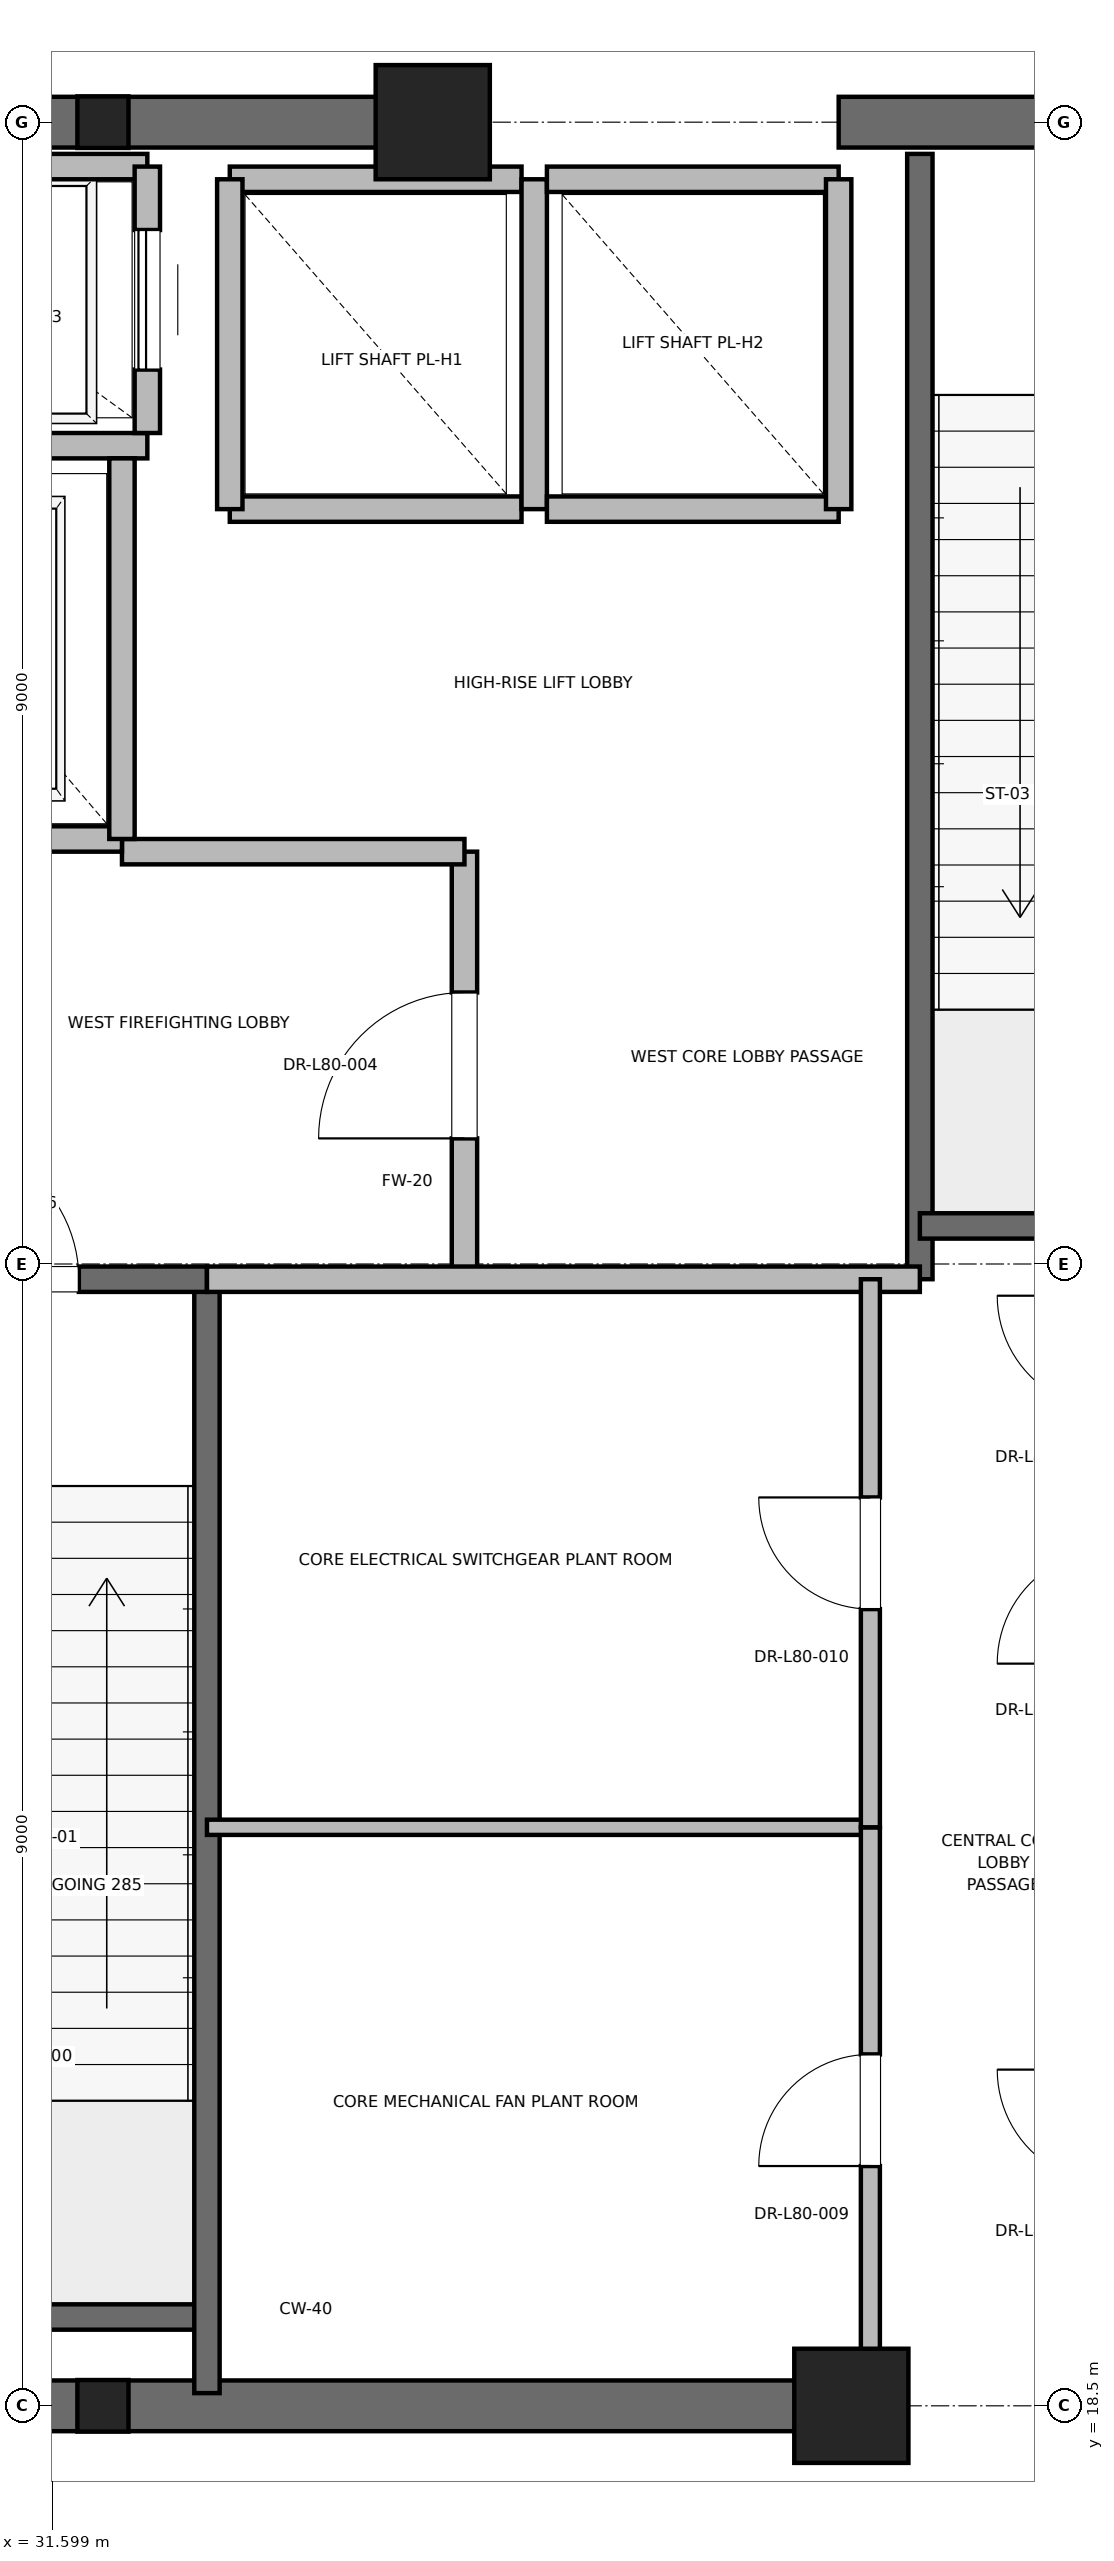
"""IFC4 building model, lengths in metres.
Left out: names, types, materials, properties, quantities, classifications, styles, units other than length and angle.
Written with IfcOpenShell. Run it as: python <this file> out.ifc"""

import sys

from ifc_helpers import new_model, si_unit, direction, frame, frame_2d, origin, origin_2d, place, context, subcontext, project, spatial, rectangle, i_section, extrude, element, fill, save


model = new_model("IFC4")
c1 = context("Model", 3, precision=1e-05, world=origin(), true_north=direction((0.0, 1.0)))
c2 = subcontext(c1, "Body", "Model", "MODEL_VIEW")
j1 = project(units=[si_unit("LENGTHUNIT", "METRE"), si_unit("PLANEANGLEUNIT", "RADIAN")], contexts=[c1])
p1 = place(None, origin())
s1 = spatial("IfcSite", under=j1, at=p1, CompositionType="ELEMENT")
p2 = place(p1, origin())
s2 = spatial("IfcBuilding", under=s1, at=p2, CompositionType="ELEMENT")
p3 = place(p2, frame((0.0, 0.0, 342.8)))
s3 = spatial("IfcBuildingStorey", under=s2, at=p3, CompositionType="ELEMENT", Elevation=342.8)
for number, where, z_axis, x_axis in (
    (1, (37.9, 18.5, 0.0), (0.0, 0.0, 1.0), (1.0, 0.0, 0.0)),
    (2, (34.6, 36.5, 0.0), (0.0, 0.0, 1.0), (1.0, 0.0, 0.0)),
):
    element("IfcColumn", number, at=place(p3, frame(where, z_axis=z_axis, x_axis=x_axis)), inside=s3, PredefinedType="PILASTER", context=c2, shape_type="SweptSolid", body=[
        extrude(rectangle(XDim=0.9, YDim=0.9, at=origin_2d()), origin(), (0.0, 0.0, 1.0), 6.0),
    ])
for number, where, z_axis, x_axis in (
    (3, (32.0, 18.5, 0.0), (0.0, 0.0, 1.0), (1.0, 0.0, 0.0)),
    (4, (32.0, 36.5, 0.0), (0.0, 0.0, 1.0), (1.0, 0.0, 0.0)),
):
    element("IfcColumn", number, at=place(p3, frame(where, z_axis=z_axis, x_axis=x_axis)), inside=s3, PredefinedType="COLUMN", context=c2, shape_type="SweptSolid", body=[
        extrude(i_section(OverallWidth=0.403, OverallDepth=0.406, WebThickness=0.027, FlangeThickness=0.043, FilletRadius=0.015, at=origin_2d()), origin(), (0.0, 0.0, 1.0), 6.0),
    ])
p4 = place(p3, frame((29.0, 18.5, 0.0), z_axis=(0.0, 0.0, 1.0), x_axis=(1.0, 0.0, 0.0)))
e5 = element("IfcWall", 5, at=p4, inside=s3, PredefinedType="SHEAR", context=c2, shape_type="SweptSolid", body=[
    extrude(rectangle(XDim=9.2, YDim=0.4, at=frame_2d((4.6, 0.0))), origin(), (0.0, 0.0, 1.0), 5.7),
])
p5 = place(p3, frame((29.0, 36.5, 0.0), z_axis=(0.0, 0.0, 1.0), x_axis=(1.0, 0.0, 0.0)))
e6 = element("IfcWall", 6, at=p5, inside=s3, PredefinedType="SHEAR", context=c2, shape_type="SweptSolid", body=[
    extrude(rectangle(XDim=5.8, YDim=0.4, at=frame_2d((2.9, 0.0))), origin(), (0.0, 0.0, 1.0), 5.7),
])
p6 = place(p3, frame((37.8, 36.5, 0.0), z_axis=(0.0, 0.0, 1.0), x_axis=(1.0, 0.0, 0.0)))
e7 = element("IfcWall", 7, at=p6, inside=s3, PredefinedType="SHEAR", context=c2, shape_type="SweptSolid", body=[
    extrude(rectangle(XDim=4.4, YDim=0.4, at=frame_2d((2.2, 0.0))), origin(), (0.0, 0.0, 1.0), 5.7),
])
p7 = place(p6, frame((1.65, 0.0, 0.0)))
e8 = element("IfcOpeningElement", 8, at=p7, cuts=e7, PredefinedType="OPENING", context=c2, shape_type="SweptSolid", body=[
    extrude(rectangle(XDim=1.1, YDim=2.15, at=frame_2d((0.55, 1.075))), frame((0.0, 0.2, 0.0), z_axis=(0.0, -1.0, 0.0), x_axis=(1.0, 0.0, 0.0)), (0.0, 0.0, 1.0), 0.4),
])
p8 = place(p3, frame((29.7, 19.2, 0.0), z_axis=(0.0, 0.0, 1.0), x_axis=(1.0, 0.0, 0.0)))
e9 = element("IfcWall", 9, at=p8, inside=s3, PredefinedType="SOLIDWALL", context=c2, shape_type="SweptSolid", body=[
    extrude(rectangle(XDim=3.12, YDim=0.2, at=frame_2d((1.56, 0.0))), origin(), (0.0, 0.0, 1.0), 5.7),
])
p9 = place(p3, frame((32.82, 18.6, 0.0), z_axis=(0.0, 0.0, 1.0), x_axis=(0.0, 1.0, 0.0)))
e10 = element("IfcWall", 10, at=p9, inside=s3, PredefinedType="SOLIDWALL", context=c2, shape_type="SweptSolid", body=[
    extrude(rectangle(XDim=8.78, YDim=0.2, at=frame_2d((4.39, 0.0))), origin(), (0.0, 0.0, 1.0), 5.7),
])
p10 = place(p3, frame((29.7, 27.38, 0.0), z_axis=(0.0, 0.0, 1.0), x_axis=(1.0, 0.0, 0.0)))
e11 = element("IfcWall", 11, at=p10, inside=s3, PredefinedType="SOLIDWALL", context=c2, shape_type="SweptSolid", body=[
    extrude(rectangle(XDim=3.12, YDim=0.2, at=frame_2d((1.56, 0.0))), origin(), (0.0, 0.0, 1.0), 5.7),
])
p11 = place(p10, frame((1.01, 0.0, 0.0)))
e12 = element("IfcOpeningElement", 12, at=p11, cuts=e11, PredefinedType="OPENING", context=c2, shape_type="SweptSolid", body=[
    extrude(rectangle(XDim=1.1, YDim=2.15, at=frame_2d((0.55, 1.075))), frame((0.0, 0.1, 0.0), z_axis=(0.0, -1.0, 0.0), x_axis=(1.0, 0.0, 0.0)), (0.0, 0.0, 1.0), 0.2),
])
p12 = place(p3, frame((38.44, 27.38, 0.0), z_axis=(0.0, 0.0, 1.0), x_axis=(0.0, 1.0, 0.0)))
e13 = element("IfcWall", 13, at=p12, inside=s3, PredefinedType="SOLIDWALL", context=c2, shape_type="SweptSolid", body=[
    extrude(rectangle(XDim=8.87, YDim=0.2, at=frame_2d((4.435, 0.0))), origin(), (0.0, 0.0, 1.0), 5.7),
])
p13 = place(p3, frame((38.44, 27.8, 0.0), z_axis=(0.0, 0.0, 1.0), x_axis=(1.0, 0.0, 0.0)))
e14 = element("IfcWall", 14, at=p13, inside=s3, PredefinedType="SOLIDWALL", context=c2, shape_type="SweptSolid", body=[
    extrude(rectangle(XDim=3.32, YDim=0.2, at=frame_2d((1.66, 0.0))), origin(), (0.0, 0.0, 1.0), 5.7),
])
p14 = place(p3, frame((34.85, 27.38, 0.0), z_axis=(0.0, 0.0, 1.0), x_axis=(0.0, 1.0, 0.0)))
e15 = element("IfcWall", 15, at=p14, inside=s3, PredefinedType="PARTITIONING", context=c2, shape_type="SweptSolid", body=[
    extrude(rectangle(XDim=3.37, YDim=0.2, at=frame_2d((1.685, 0.0))), origin(), (0.0, 0.0, 1.0), 5.7),
])
p15 = place(p14, frame((1.11, 0.0, 0.0)))
e16 = element("IfcOpeningElement", 16, at=p15, cuts=e15, PredefinedType="OPENING", context=c2, shape_type="SweptSolid", body=[
    extrude(rectangle(XDim=1.15, YDim=2.2, at=frame_2d((0.575, 1.1))), frame((0.0, 0.1, 0.0), z_axis=(0.0, -1.0, 0.0), x_axis=(1.0, 0.0, 0.0)), (0.0, 0.0, 1.0), 0.2),
])
p16 = place(p3, frame((32.82, 27.38, 0.0), z_axis=(0.0, 0.0, 1.0), x_axis=(1.0, 0.0, 0.0)))
e17 = element("IfcWall", 17, at=p16, inside=s3, PredefinedType="PARTITIONING", context=c2, shape_type="SweptSolid", body=[
    extrude(rectangle(XDim=5.62, YDim=0.2, at=frame_2d((2.81, 0.0))), origin(), (0.0, 0.0, 1.0), 5.7),
])
p17 = place(p3, frame((32.15, 30.75, 0.0), z_axis=(0.0, 0.0, 1.0), x_axis=(1.0, 0.0, 0.0)))
e18 = element("IfcWall", 18, at=p17, inside=s3, PredefinedType="PARTITIONING", context=c2, shape_type="SweptSolid", body=[
    extrude(rectangle(XDim=2.7, YDim=0.2, at=frame_2d((1.35, 0.0))), origin(), (0.0, 0.0, 1.0), 5.7),
])
p18 = place(p3, frame((29.55, 30.85, 0.0), z_axis=(0.0, 0.0, 1.0), x_axis=(1.0, 0.0, 0.0)))
e19 = element("IfcWall", 19, at=p18, inside=s3, PredefinedType="SOLIDWALL", context=c2, shape_type="SweptSolid", body=[
    extrude(rectangle(XDim=2.6, YDim=0.2, at=frame_2d((1.3, 0.0))), origin(), (0.0, 0.0, 1.0), 4.78),
])
p19 = place(p18, frame((0.75, 0.0, 0.0)))
e20 = element("IfcOpeningElement", 20, at=p19, cuts=e19, PredefinedType="OPENING", context=c2, shape_type="SweptSolid", body=[
    extrude(rectangle(XDim=1.1, YDim=2.2, at=frame_2d((0.55, 1.1))), frame((0.0, 0.1, 0.0), z_axis=(0.0, -1.0, 0.0), x_axis=(1.0, 0.0, 0.0)), (0.0, 0.0, 1.0), 0.2),
])
p20 = place(p3, frame((29.55, 33.95, 0.0), z_axis=(0.0, 0.0, 1.0), x_axis=(1.0, 0.0, 0.0)))
e21 = element("IfcWall", 21, at=p20, inside=s3, PredefinedType="SOLIDWALL", context=c2, shape_type="SweptSolid", body=[
    extrude(rectangle(XDim=2.8, YDim=0.2, at=frame_2d((1.4, 0.0))), origin(), (0.0, 0.0, 1.0), 5.7),
])
p21 = place(p3, frame((32.15, 30.85, 0.0), z_axis=(0.0, 0.0, 1.0), x_axis=(0.0, 1.0, 0.0)))
e22 = element("IfcWall", 22, at=p21, inside=s3, PredefinedType="SOLIDWALL", context=c2, shape_type="SweptSolid", body=[
    extrude(rectangle(XDim=3.0, YDim=0.2, at=frame_2d((1.5, 0.0))), origin(), (0.0, 0.0, 1.0), 5.7),
])
p22 = place(p3, frame((32.35, 36.15, 0.0), z_axis=(0.0, 0.0, 1.0), x_axis=(-1.0, 0.0, 0.0)))
e23 = element("IfcWall", 23, at=p22, inside=s3, PredefinedType="SOLIDWALL", context=c2, shape_type="SweptSolid", body=[
    extrude(rectangle(XDim=2.8, YDim=0.2, at=frame_2d((1.4, 0.0))), origin(), (0.0, 0.0, 1.0), 4.753),
])
p23 = place(p3, frame((32.35, 34.05, 0.0), z_axis=(0.0, 0.0, 1.0), x_axis=(0.0, 1.0, 0.0)))
e24 = element("IfcWall", 24, at=p23, inside=s3, PredefinedType="SOLIDWALL", context=c2, shape_type="SweptSolid", body=[
    extrude(rectangle(XDim=2.1, YDim=0.2, at=frame_2d((1.05, 0.0))), origin(), (0.0, 0.0, 1.0), 5.7),
])
p24 = place(p23, frame((0.5, 0.0, 0.0)))
e25 = element("IfcOpeningElement", 25, at=p24, cuts=e24, PredefinedType="OPENING", context=c2, shape_type="SweptSolid", body=[
    extrude(rectangle(XDim=1.1, YDim=2.2, at=frame_2d((0.55, 1.1))), frame((0.0, 0.1, 0.0), z_axis=(0.0, -1.0, 0.0), x_axis=(1.0, 0.0, 0.0)), (0.0, 0.0, 1.0), 0.2),
])
p25 = place(p3, frame((33.0, 33.45, 0.0), z_axis=(0.0, 0.0, 1.0), x_axis=(1.0, 0.0, 0.0)))
e26 = element("IfcWall", 26, at=p25, inside=s3, PredefinedType="SOLIDWALL", context=c2, shape_type="SweptSolid", body=[
    extrude(rectangle(XDim=2.3, YDim=0.2, at=frame_2d((1.15, 0.0))), origin(), (0.0, 0.0, 1.0), 5.7),
])
p26 = place(p3, frame((35.3, 36.05, 0.0), z_axis=(0.0, 0.0, 1.0), x_axis=(-1.0, 0.0, 0.0)))
e27 = element("IfcWall", 27, at=p26, inside=s3, PredefinedType="SOLIDWALL", context=c2, shape_type="SweptSolid", body=[
    extrude(rectangle(XDim=2.3, YDim=0.2, at=frame_2d((1.15, 0.0))), origin(), (0.0, 0.0, 1.0), 4.78),
])
p27 = place(p3, frame((33.0, 36.05, 0.0), z_axis=(0.0, 0.0, 1.0), x_axis=(0.0, -1.0, 0.0)))
e28 = element("IfcWall", 28, at=p27, inside=s3, PredefinedType="SOLIDWALL", context=c2, shape_type="SweptSolid", body=[
    extrude(rectangle(XDim=2.6, YDim=0.2, at=frame_2d((1.3, 0.0))), origin(), (0.0, 0.0, 1.0), 5.7),
])
p28 = place(p3, frame((35.4, 33.45, 0.0), z_axis=(0.0, 0.0, 1.0), x_axis=(0.0, 1.0, 0.0)))
e29 = element("IfcWall", 29, at=p28, inside=s3, PredefinedType="SOLIDWALL", context=c2, shape_type="SweptSolid", body=[
    extrude(rectangle(XDim=2.6, YDim=0.2, at=frame_2d((1.3, 0.0))), origin(), (0.0, 0.0, 1.0), 4.78),
])
p29 = place(p3, frame((35.5, 33.45, 0.0), z_axis=(0.0, 0.0, 1.0), x_axis=(1.0, 0.0, 0.0)))
e30 = element("IfcWall", 30, at=p29, inside=s3, PredefinedType="SOLIDWALL", context=c2, shape_type="SweptSolid", body=[
    extrude(rectangle(XDim=2.3, YDim=0.2, at=frame_2d((1.15, 0.0))), origin(), (0.0, 0.0, 1.0), 5.7),
])
p30 = place(p3, frame((37.8, 36.05, 0.0), z_axis=(0.0, 0.0, 1.0), x_axis=(-1.0, 0.0, 0.0)))
e31 = element("IfcWall", 31, at=p30, inside=s3, PredefinedType="SOLIDWALL", context=c2, shape_type="SweptSolid", body=[
    extrude(rectangle(XDim=2.3, YDim=0.2, at=frame_2d((1.15, 0.0))), origin(), (0.0, 0.0, 1.0), 4.78),
])
p31 = place(p3, frame((37.8, 33.45, 0.0), z_axis=(0.0, 0.0, 1.0), x_axis=(0.0, 1.0, 0.0)))
e32 = element("IfcWall", 32, at=p31, inside=s3, PredefinedType="SOLIDWALL", context=c2, shape_type="SweptSolid", body=[
    extrude(rectangle(XDim=2.6, YDim=0.2, at=frame_2d((1.3, 0.0))), origin(), (0.0, 0.0, 1.0), 4.78),
])
p32 = place(p3, frame((32.82, 23.06, 0.0), z_axis=(0.0, 0.0, 1.0), x_axis=(1.0, 0.0, 0.0)))
e33 = element("IfcWall", 33, at=p32, inside=s3, PredefinedType="PARTITIONING", context=c2, shape_type="SweptSolid", body=[
    extrude(rectangle(XDim=5.23, YDim=0.12, at=frame_2d((2.615, 0.0))), origin(), (0.0, 0.0, 1.0), 2.85),
])
p33 = place(p3, frame((38.05, 18.6, 0.0), z_axis=(0.0, 0.0, 1.0), x_axis=(0.0, 1.0, 0.0)))
e34 = element("IfcWall", 34, at=p33, inside=s3, PredefinedType="PARTITIONING", context=c2, shape_type="SweptSolid", body=[
    extrude(rectangle(XDim=4.46, YDim=0.15, at=frame_2d((2.23, 0.0))), origin(), (0.0, 0.0, 1.0), 2.85),
])
p34 = place(p33, frame((1.79, 0.0, 0.0)))
e35 = element("IfcOpeningElement", 35, at=p34, cuts=e34, PredefinedType="OPENING", context=c2, shape_type="SweptSolid", body=[
    extrude(rectangle(XDim=0.88, YDim=2.1, at=frame_2d((0.44, 1.05))), frame((0.0, 0.075, 0.0), z_axis=(0.0, -1.0, 0.0), x_axis=(1.0, 0.0, 0.0)), (0.0, 0.0, 1.0), 0.15),
])
p35 = place(p3, frame((38.05, 23.06, 0.0), z_axis=(0.0, 0.0, 1.0), x_axis=(0.0, 1.0, 0.0)))
e36 = element("IfcWall", 36, at=p35, inside=s3, PredefinedType="PARTITIONING", context=c2, shape_type="SweptSolid", body=[
    extrude(rectangle(XDim=4.32, YDim=0.15, at=frame_2d((2.16, 0.0))), origin(), (0.0, 0.0, 1.0), 2.85),
])
p36 = place(p35, frame((1.72, 0.0, 0.0)))
e37 = element("IfcOpeningElement", 37, at=p36, cuts=e36, PredefinedType="OPENING", context=c2, shape_type="SweptSolid", body=[
    extrude(rectangle(XDim=0.88, YDim=2.1, at=frame_2d((0.44, 1.05))), frame((0.0, 0.075, 0.0), z_axis=(0.0, -1.0, 0.0), x_axis=(1.0, 0.0, 0.0)), (0.0, 0.0, 1.0), 0.15),
])
p37 = place(p11, origin())
e38 = element("IfcDoor", 38, at=p37, inside=s3, OperationType="SINGLE_SWING_LEFT", PredefinedType="DOOR", context=c2, shape_type="SweptSolid", body=[
    extrude(rectangle(XDim=1.1, YDim=2.15, at=frame_2d((0.55, 1.075))), frame((0.0, 0.025, 0.0), z_axis=(0.0, -1.0, 0.0), x_axis=(1.0, 0.0, 0.0)), (0.0, 0.0, 1.0), 0.05),
])
fill(e12, e38)
p38 = place(p15, origin())
e39 = element("IfcDoor", 39, at=p38, inside=s3, OperationType="SINGLE_SWING_LEFT", PredefinedType="DOOR", context=c2, shape_type="SweptSolid", body=[
    extrude(rectangle(XDim=1.15, YDim=2.2, at=frame_2d((0.575, 1.1))), frame((0.0, 0.025, 0.0), z_axis=(0.0, -1.0, 0.0), x_axis=(1.0, 0.0, 0.0)), (0.0, 0.0, 1.0), 0.05),
])
fill(e16, e39)
p39 = place(p24, origin())
e40 = element("IfcDoor", 40, at=p39, inside=s3, OperationType="SLIDING_TO_RIGHT", PredefinedType="DOOR", context=c2, shape_type="SweptSolid", body=[
    extrude(rectangle(XDim=1.1, YDim=2.2, at=frame_2d((0.55, 1.1))), frame((0.0, 0.025, 0.0), z_axis=(0.0, -1.0, 0.0), x_axis=(1.0, 0.0, 0.0)), (0.0, 0.0, 1.0), 0.05),
])
fill(e25, e40)
p40 = place(p34, origin())
e41 = element("IfcDoor", 41, at=p40, inside=s3, OperationType="SINGLE_SWING_LEFT", PredefinedType="DOOR", context=c2, shape_type="SweptSolid", body=[
    extrude(rectangle(XDim=0.88, YDim=2.1, at=frame_2d((0.44, 1.05))), frame((0.0, 0.025, 0.0), z_axis=(0.0, -1.0, 0.0), x_axis=(1.0, 0.0, 0.0)), (0.0, 0.0, 1.0), 0.05),
])
fill(e35, e41)
p41 = place(p36, origin())
e42 = element("IfcDoor", 42, at=p41, inside=s3, OperationType="SINGLE_SWING_RIGHT", PredefinedType="DOOR", context=c2, shape_type="SweptSolid", body=[
    extrude(rectangle(XDim=0.88, YDim=2.1, at=frame_2d((0.44, 1.05))), frame((0.0, 0.025, 0.0), z_axis=(0.0, -1.0, 0.0), x_axis=(1.0, 0.0, 0.0)), (0.0, 0.0, 1.0), 0.05),
])
fill(e37, e42)
save(model, sys.argv[1])
